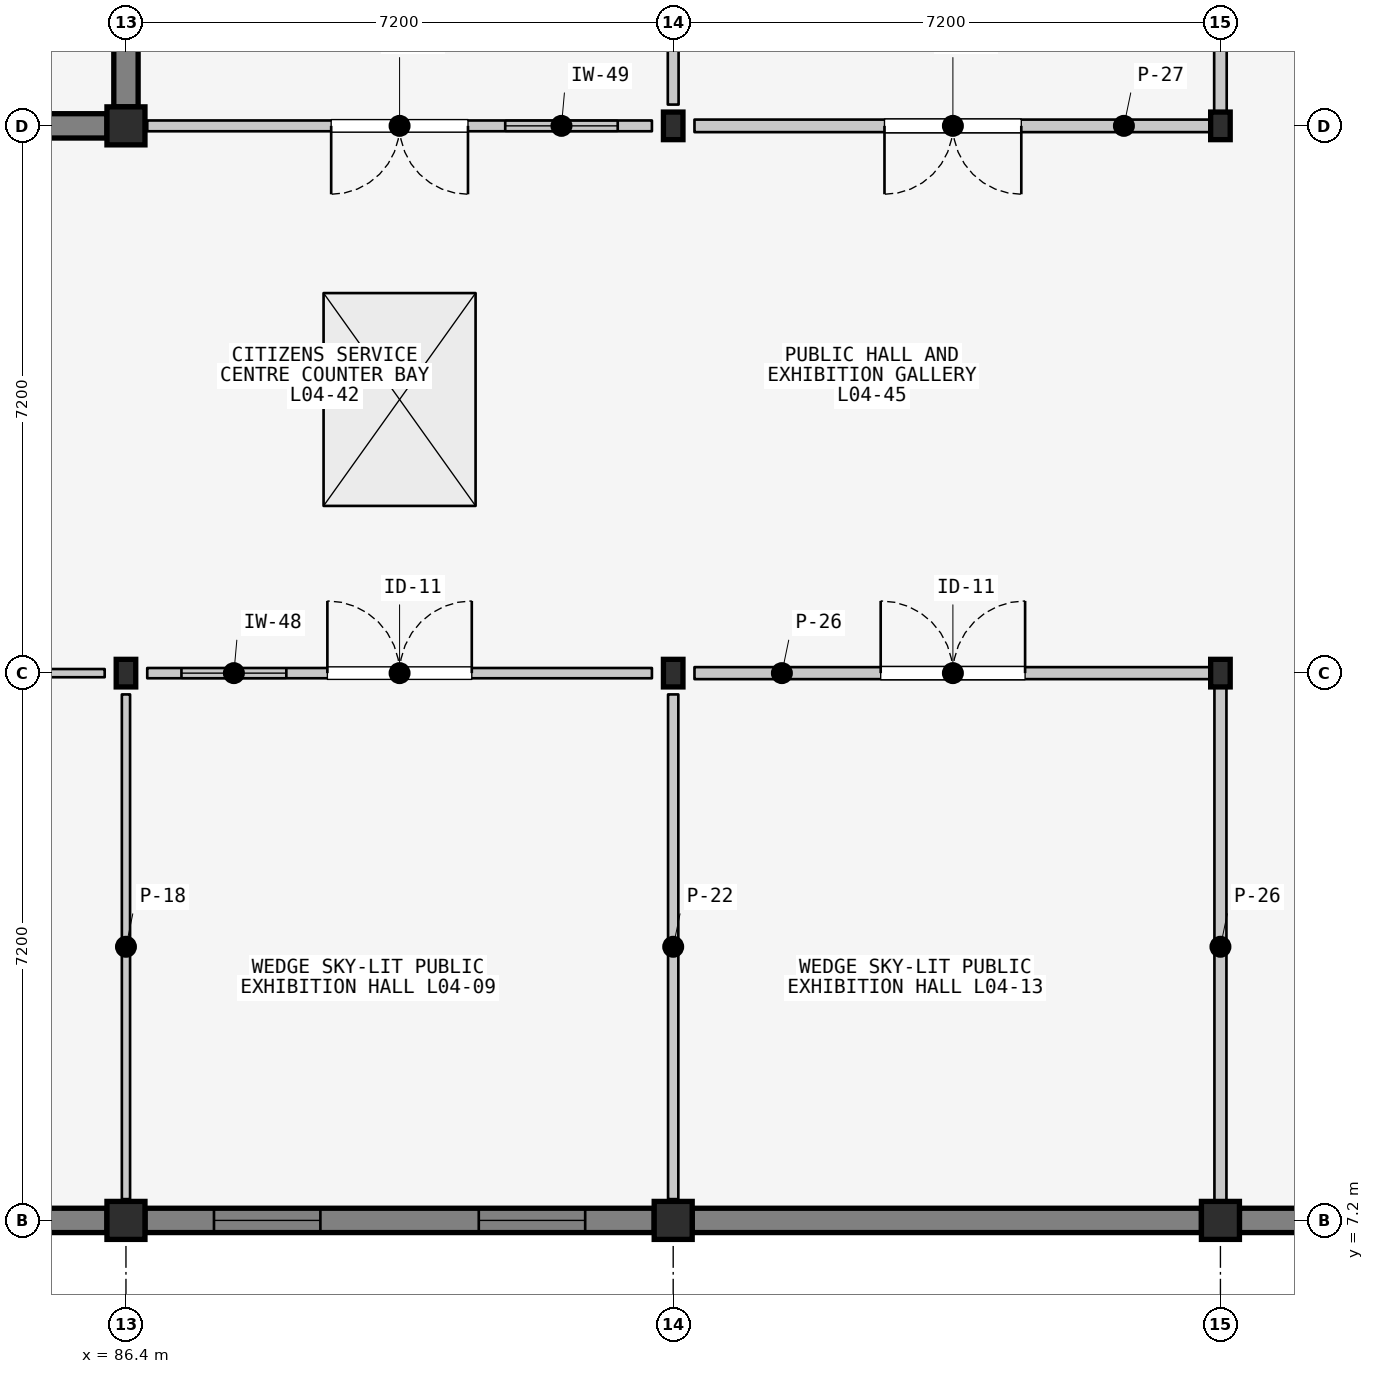
"""IFC4 building model, lengths in metres.
Left out: names, types, materials, properties, quantities, classifications, styles, units other than length and angle.
Written with IfcOpenShell. Run it as: python <this file> out.ifc"""

import sys

from ifc_helpers import new_model, si_unit, direction, frame, frame_2d, origin, origin_2d, place, context, subcontext, project, spatial, rectangle, i_section, extrude, element, fill, save


model = new_model("IFC4")
c1 = context("Model", 3, precision=1e-05, world=origin(), true_north=direction((0.0, 1.0)))
c2 = subcontext(c1, "Body", "Model", "MODEL_VIEW")
j1 = project(units=[si_unit("LENGTHUNIT", "METRE"), si_unit("PLANEANGLEUNIT", "RADIAN")], contexts=[c1])
p1 = place(None, origin())
s1 = spatial("IfcSite", under=j1, at=p1, CompositionType="ELEMENT")
p2 = place(p1, origin())
s2 = spatial("IfcBuilding", under=s1, at=p2, CompositionType="ELEMENT")
p3 = place(p2, frame((0.0, 0.0, 14.1)))
s3 = spatial("IfcBuildingStorey", under=s2, at=p3, CompositionType="ELEMENT", Elevation=14.1)
p4 = place(p3, frame((86.4, 7.2, 0.0), z_axis=(0.0, 0.0, 1.0), x_axis=(1.0, 0.0, 0.0)))
e1 = element("IfcColumn", 1, at=p4, inside=s3, PredefinedType="COLUMN", context=c2, shape_type="SweptSolid", body=[
    extrude(rectangle(XDim=0.5, YDim=0.5, at=origin_2d()), origin(), (0.0, 0.0, 1.0), 4.962),
])
p5 = place(p3, frame((86.4, 14.4, 0.0), z_axis=(0.0, 0.0, 1.0), x_axis=(1.0, 0.0, 0.0)))
e2 = element("IfcColumn", 2, at=p5, inside=s3, PredefinedType="COLUMN", context=c2, shape_type="SweptSolid", body=[
    extrude(i_section(OverallWidth=0.257, OverallDepth=0.363, WebThickness=0.013, FlangeThickness=0.022, FilletRadius=0.015, at=origin_2d()), origin(), (0.0, 0.0, 1.0), 6.305),
])
p6 = place(p3, frame((86.4, 21.6, 0.0), z_axis=(0.0, 0.0, 1.0), x_axis=(1.0, 0.0, 0.0)))
e3 = element("IfcColumn", 3, at=p6, inside=s3, PredefinedType="COLUMN", context=c2, shape_type="SweptSolid", body=[
    extrude(rectangle(XDim=0.5, YDim=0.5, at=origin_2d()), origin(), (0.0, 0.0, 1.0), 7.647),
])
p7 = place(p3, frame((93.6, 7.2, 0.0), z_axis=(0.0, 0.0, 1.0), x_axis=(1.0, 0.0, 0.0)))
e4 = element("IfcColumn", 4, at=p7, inside=s3, PredefinedType="COLUMN", context=c2, shape_type="SweptSolid", body=[
    extrude(rectangle(XDim=0.5, YDim=0.5, at=origin_2d()), origin(), (0.0, 0.0, 1.0), 4.99),
])
p8 = place(p3, frame((93.6, 14.4, 0.0), z_axis=(0.0, 0.0, 1.0), x_axis=(1.0, 0.0, 0.0)))
e5 = element("IfcColumn", 5, at=p8, inside=s3, PredefinedType="COLUMN", context=c2, shape_type="SweptSolid", body=[
    extrude(i_section(OverallWidth=0.257, OverallDepth=0.363, WebThickness=0.013, FlangeThickness=0.022, FilletRadius=0.015, at=origin_2d()), origin(), (0.0, 0.0, 1.0), 6.333),
])
p9 = place(p3, frame((93.6, 21.6, 0.0), z_axis=(0.0, 0.0, 1.0), x_axis=(1.0, 0.0, 0.0)))
e6 = element("IfcColumn", 6, at=p9, inside=s3, PredefinedType="COLUMN", context=c2, shape_type="SweptSolid", body=[
    extrude(i_section(OverallWidth=0.257, OverallDepth=0.363, WebThickness=0.013, FlangeThickness=0.022, FilletRadius=0.015, at=origin_2d()), origin(), (0.0, 0.0, 1.0), 7.676),
])
p10 = place(p3, frame((100.8, 7.2, 0.0), z_axis=(0.0, 0.0, 1.0), x_axis=(1.0, 0.0, 0.0)))
e7 = element("IfcColumn", 7, at=p10, inside=s3, PredefinedType="COLUMN", context=c2, shape_type="SweptSolid", body=[
    extrude(rectangle(XDim=0.5, YDim=0.5, at=origin_2d()), origin(), (0.0, 0.0, 1.0), 5.019),
])
p11 = place(p3, frame((100.8, 14.4, 0.0), z_axis=(0.0, 0.0, 1.0), x_axis=(1.0, 0.0, 0.0)))
e8 = element("IfcColumn", 8, at=p11, inside=s3, PredefinedType="COLUMN", context=c2, shape_type="SweptSolid", body=[
    extrude(i_section(OverallWidth=0.257, OverallDepth=0.363, WebThickness=0.013, FlangeThickness=0.022, FilletRadius=0.015, at=origin_2d()), origin(), (0.0, 0.0, 1.0), 6.362),
])
p12 = place(p3, frame((100.8, 21.6, 0.0), z_axis=(0.0, 0.0, 1.0), x_axis=(1.0, 0.0, 0.0)))
e9 = element("IfcColumn", 9, at=p12, inside=s3, PredefinedType="COLUMN", context=c2, shape_type="SweptSolid", body=[
    extrude(i_section(OverallWidth=0.257, OverallDepth=0.363, WebThickness=0.013, FlangeThickness=0.022, FilletRadius=0.015, at=origin_2d()), origin(), (0.0, 0.0, 1.0), 7.705),
])
p13 = place(p3, frame((86.15, 7.2, 0.0), z_axis=(0.0, 0.0, 1.0), x_axis=(-1.0, 0.0, 0.0)))
e10 = element("IfcWall", 10, at=p13, inside=s3, PredefinedType="SOLIDWALL", context=c2, shape_type="SweptSolid", body=[
    extrude(rectangle(XDim=6.7, YDim=0.32, at=frame_2d((3.35, 0.0))), origin(), (0.0, 0.0, 1.0), 4.206),
])
p14 = place(p3, frame((79.45, 21.6, 0.0), z_axis=(0.0, 0.0, 1.0), x_axis=(1.0, 0.0, 0.0)))
e11 = element("IfcWall", 11, at=p14, inside=s3, PredefinedType="SOLIDWALL", context=c2, shape_type="SweptSolid", body=[
    extrude(rectangle(XDim=6.7, YDim=0.32, at=frame_2d((3.35, 0.0))), origin(), (0.0, 0.0, 1.0), 6.892),
])
p15 = place(p3, frame((93.35, 7.2, 0.0), z_axis=(0.0, 0.0, 1.0), x_axis=(-1.0, 0.0, 0.0)))
e12 = element("IfcWall", 12, at=p15, inside=s3, PredefinedType="SOLIDWALL", context=c2, shape_type="SweptSolid", body=[
    extrude(rectangle(XDim=6.7, YDim=0.32, at=frame_2d((3.35, 0.0))), origin(), (0.0, 0.0, 1.0), 4.235),
])
p16 = place(p15, frame((0.908, 0.0, 0.95)))
e13 = element("IfcOpeningElement", 13, at=p16, cuts=e12, PredefinedType="OPENING", context=c2, shape_type="SweptSolid", body=[
    extrude(rectangle(XDim=1.4, YDim=2.1, at=frame_2d((0.7, 1.05))), frame((0.0, 0.17, 0.0), z_axis=(0.0, -1.0, 0.0), x_axis=(1.0, 0.0, 0.0)), (0.0, 0.0, 1.0), 0.34),
])
p17 = place(p15, frame((4.392, 0.0, 0.95)))
e14 = element("IfcOpeningElement", 14, at=p17, cuts=e12, PredefinedType="OPENING", context=c2, shape_type="SweptSolid", body=[
    extrude(rectangle(XDim=1.4, YDim=2.1, at=frame_2d((0.7, 1.05))), frame((0.0, 0.17, 0.0), z_axis=(0.0, -1.0, 0.0), x_axis=(1.0, 0.0, 0.0)), (0.0, 0.0, 1.0), 0.34),
])
p18 = place(p3, frame((86.4, 21.85, 0.0), z_axis=(0.0, 0.0, 1.0), x_axis=(0.0, 1.0, 0.0)))
e15 = element("IfcWall", 15, at=p18, inside=s3, PredefinedType="SOLIDWALL", context=c2, shape_type="SweptSolid", body=[
    extrude(rectangle(XDim=6.7, YDim=0.32, at=frame_2d((3.35, 0.0))), origin(), (0.0, 0.0, 1.0), 6.965),
])
p19 = place(p3, frame((100.55, 7.2, 0.0), z_axis=(0.0, 0.0, 1.0), x_axis=(-1.0, 0.0, 0.0)))
e16 = element("IfcWall", 16, at=p19, inside=s3, PredefinedType="SOLIDWALL", context=c2, shape_type="SweptSolid", body=[
    extrude(rectangle(XDim=6.7, YDim=0.32, at=frame_2d((3.35, 0.0))), origin(), (0.0, 0.0, 1.0), 4.263),
])
p20 = place(p3, frame((107.75, 7.2, 0.0), z_axis=(0.0, 0.0, 1.0), x_axis=(-1.0, 0.0, 0.0)))
e17 = element("IfcWall", 17, at=p20, inside=s3, PredefinedType="SOLIDWALL", context=c2, shape_type="SweptSolid", body=[
    extrude(rectangle(XDim=6.7, YDim=0.32, at=frame_2d((3.35, 0.0))), origin(), (0.0, 0.0, 1.0), 4.292),
])
p21 = place(p20, frame((0.908, 0.0, 0.95)))
e18 = element("IfcOpeningElement", 18, at=p21, cuts=e17, PredefinedType="OPENING", context=c2, shape_type="SweptSolid", body=[
    extrude(rectangle(XDim=1.4, YDim=2.1, at=frame_2d((0.7, 1.05))), frame((0.0, 0.17, 0.0), z_axis=(0.0, -1.0, 0.0), x_axis=(1.0, 0.0, 0.0)), (0.0, 0.0, 1.0), 0.34),
])
p22 = place(p20, frame((4.392, 0.0, 0.95)))
e19 = element("IfcOpeningElement", 19, at=p22, cuts=e17, PredefinedType="OPENING", context=c2, shape_type="SweptSolid", body=[
    extrude(rectangle(XDim=1.4, YDim=2.1, at=frame_2d((0.7, 1.05))), frame((0.0, 0.17, 0.0), z_axis=(0.0, -1.0, 0.0), x_axis=(1.0, 0.0, 0.0)), (0.0, 0.0, 1.0), 0.34),
])
p23 = place(p3, frame((79.48, 14.4, 0.0), z_axis=(0.0, 0.0, 1.0), x_axis=(1.0, 0.0, 0.0)))
e20 = element("IfcWall", 20, at=p23, inside=s3, PredefinedType="PARTITIONING", context=c2, shape_type="SweptSolid", body=[
    extrude(rectangle(XDim=6.64, YDim=0.108, at=frame_2d((3.32, 0.0))), origin(), (0.0, 0.0, 1.0), 3.72),
])
p24 = place(p23, frame((2.37, 0.0, 0.0)))
e21 = element("IfcOpeningElement", 21, at=p24, cuts=e20, PredefinedType="OPENING", context=c2, shape_type="SweptSolid", body=[
    extrude(rectangle(XDim=1.9, YDim=2.45, at=frame_2d((0.95, 1.225))), frame((0.0, 0.064, 0.0), z_axis=(0.0, -1.0, 0.0), x_axis=(1.0, 0.0, 0.0)), (0.0, 0.0, 1.0), 0.128),
])
p25 = place(p3, frame((86.4, 14.12, 0.0), z_axis=(0.0, 0.0, 1.0), x_axis=(0.0, -1.0, 0.0)))
e22 = element("IfcWall", 22, at=p25, inside=s3, PredefinedType="PARTITIONING", context=c2, shape_type="SweptSolid", body=[
    extrude(rectangle(XDim=6.64, YDim=0.108, at=frame_2d((3.32, 0.0))), origin(), (0.0, 0.0, 1.0), 3.72),
])
p26 = place(p3, frame((86.68, 14.4, 0.0), z_axis=(0.0, 0.0, 1.0), x_axis=(1.0, 0.0, 0.0)))
e23 = element("IfcWall", 23, at=p26, inside=s3, PredefinedType="PARTITIONING", context=c2, shape_type="SweptSolid", body=[
    extrude(rectangle(XDim=6.64, YDim=0.135, at=frame_2d((3.32, 0.0))), origin(), (0.0, 0.0, 1.0), 3.72),
])
p27 = place(p26, frame((2.37, 0.0, 0.0)))
e24 = element("IfcOpeningElement", 24, at=p27, cuts=e23, PredefinedType="OPENING", context=c2, shape_type="SweptSolid", body=[
    extrude(rectangle(XDim=1.9, YDim=2.45, at=frame_2d((0.95, 1.225))), frame((0.0, 0.077, 0.0), z_axis=(0.0, -1.0, 0.0), x_axis=(1.0, 0.0, 0.0)), (0.0, 0.0, 1.0), 0.155),
])
p28 = place(p26, frame((0.45, 0.0, 1.05)))
e25 = element("IfcOpeningElement", 25, at=p28, cuts=e23, PredefinedType="OPENING", context=c2, shape_type="SweptSolid", body=[
    extrude(rectangle(XDim=1.38, YDim=1.44, at=frame_2d((0.69, 0.72))), frame((0.0, 0.077, 0.0), z_axis=(0.0, -1.0, 0.0), x_axis=(1.0, 0.0, 0.0)), (0.0, 0.0, 1.0), 0.155),
])
p29 = place(p3, frame((93.6, 14.12, 0.0), z_axis=(0.0, 0.0, 1.0), x_axis=(0.0, -1.0, 0.0)))
e26 = element("IfcWall", 26, at=p29, inside=s3, PredefinedType="PARTITIONING", context=c2, shape_type="SweptSolid", body=[
    extrude(rectangle(XDim=6.64, YDim=0.135, at=frame_2d((3.32, 0.0))), origin(), (0.0, 0.0, 1.0), 3.72),
])
p30 = place(p3, frame((93.32, 21.6, 0.0), z_axis=(0.0, 0.0, 1.0), x_axis=(-1.0, 0.0, 0.0)))
e27 = element("IfcWall", 27, at=p30, inside=s3, PredefinedType="PARTITIONING", context=c2, shape_type="SweptSolid", body=[
    extrude(rectangle(XDim=6.64, YDim=0.142, at=frame_2d((3.32, 0.0))), origin(), (0.0, 0.0, 1.0), 3.72),
])
p31 = place(p30, frame((2.42, 0.0, 0.0)))
e28 = element("IfcOpeningElement", 28, at=p31, cuts=e27, PredefinedType="OPENING", context=c2, shape_type="SweptSolid", body=[
    extrude(rectangle(XDim=1.8, YDim=2.4, at=frame_2d((0.9, 1.2))), frame((0.0, 0.081, 0.0), z_axis=(0.0, -1.0, 0.0), x_axis=(1.0, 0.0, 0.0)), (0.0, 0.0, 1.0), 0.162),
])
p32 = place(p30, frame((0.45, 0.0, 1.05)))
e29 = element("IfcOpeningElement", 29, at=p32, cuts=e27, PredefinedType="OPENING", context=c2, shape_type="SweptSolid", body=[
    extrude(rectangle(XDim=1.48, YDim=1.48, at=frame_2d((0.74, 0.74))), frame((0.0, 0.081, 0.0), z_axis=(0.0, -1.0, 0.0), x_axis=(1.0, 0.0, 0.0)), (0.0, 0.0, 1.0), 0.162),
])
p33 = place(p3, frame((93.6, 28.52, 0.0), z_axis=(0.0, 0.0, 1.0), x_axis=(0.0, -1.0, 0.0)))
e30 = element("IfcWall", 30, at=p33, inside=s3, PredefinedType="PARTITIONING", context=c2, shape_type="SweptSolid", body=[
    extrude(rectangle(XDim=6.64, YDim=0.142, at=frame_2d((3.32, 0.0))), origin(), (0.0, 0.0, 1.0), 3.72),
])
p34 = place(p3, frame((93.88, 14.4, 0.0), z_axis=(0.0, 0.0, 1.0), x_axis=(1.0, 0.0, 0.0)))
e31 = element("IfcWall", 31, at=p34, inside=s3, PredefinedType="PARTITIONING", context=c2, shape_type="SweptSolid", body=[
    extrude(rectangle(XDim=6.8, YDim=0.158, at=frame_2d((3.4, 0.0))), origin(), (0.0, 0.0, 1.0), 3.72),
])
p35 = place(p34, frame((2.45, 0.0, 0.0)))
e32 = element("IfcOpeningElement", 32, at=p35, cuts=e31, PredefinedType="OPENING", context=c2, shape_type="SweptSolid", body=[
    extrude(rectangle(XDim=1.9, YDim=2.45, at=frame_2d((0.95, 1.225))), frame((0.0, 0.089, 0.0), z_axis=(0.0, -1.0, 0.0), x_axis=(1.0, 0.0, 0.0)), (0.0, 0.0, 1.0), 0.178),
])
p36 = place(p3, frame((100.8, 14.28, 0.0), z_axis=(0.0, 0.0, 1.0), x_axis=(0.0, -1.0, 0.0)))
e33 = element("IfcWall", 33, at=p36, inside=s3, PredefinedType="PARTITIONING", context=c2, shape_type="SweptSolid", body=[
    extrude(rectangle(XDim=6.96, YDim=0.158, at=frame_2d((3.48, 0.0))), origin(), (0.0, 0.0, 1.0), 3.72),
])
p37 = place(p3, frame((100.68, 21.6, 0.0), z_axis=(0.0, 0.0, 1.0), x_axis=(-1.0, 0.0, 0.0)))
e34 = element("IfcWall", 34, at=p37, inside=s3, PredefinedType="PARTITIONING", context=c2, shape_type="SweptSolid", body=[
    extrude(rectangle(XDim=6.8, YDim=0.165, at=frame_2d((3.4, 0.0))), origin(), (0.0, 0.0, 1.0), 3.72),
])
p38 = place(p37, frame((2.5, 0.0, 0.0)))
e35 = element("IfcOpeningElement", 35, at=p38, cuts=e34, PredefinedType="OPENING", context=c2, shape_type="SweptSolid", body=[
    extrude(rectangle(XDim=1.8, YDim=2.4, at=frame_2d((0.9, 1.2))), frame((0.0, 0.093, 0.0), z_axis=(0.0, -1.0, 0.0), x_axis=(1.0, 0.0, 0.0)), (0.0, 0.0, 1.0), 0.185),
])
p39 = place(p3, frame((100.8, 28.68, 0.0), z_axis=(0.0, 0.0, 1.0), x_axis=(0.0, -1.0, 0.0)))
e36 = element("IfcWall", 36, at=p39, inside=s3, PredefinedType="PARTITIONING", context=c2, shape_type="SweptSolid", body=[
    extrude(rectangle(XDim=6.96, YDim=0.165, at=frame_2d((3.48, 0.0))), origin(), (0.0, 0.0, 1.0), 3.72),
])
p40 = place(p16, origin())
e37 = element("IfcWindow", 37, at=p40, inside=s3, PartitioningType="SINGLE_PANEL", PredefinedType="WINDOW", context=c2, shape_type="SweptSolid", body=[
    extrude(rectangle(XDim=1.4, YDim=2.1, at=frame_2d((0.7, 1.05))), frame((0.0, 0.03, 0.0), z_axis=(0.0, -1.0, 0.0), x_axis=(1.0, 0.0, 0.0)), (0.0, 0.0, 1.0), 0.06),
])
fill(e13, e37)
p41 = place(p17, origin())
e38 = element("IfcWindow", 38, at=p41, inside=s3, PartitioningType="SINGLE_PANEL", PredefinedType="WINDOW", context=c2, shape_type="SweptSolid", body=[
    extrude(rectangle(XDim=1.4, YDim=2.1, at=frame_2d((0.7, 1.05))), frame((0.0, 0.03, 0.0), z_axis=(0.0, -1.0, 0.0), x_axis=(1.0, 0.0, 0.0)), (0.0, 0.0, 1.0), 0.06),
])
fill(e14, e38)
p42 = place(p3, frame((64.8, 7.2, 5.1), z_axis=(-0.003900009496, -0.183347177316, 0.983040488737), x_axis=(0.999992130387, 0.0, 0.003967261622)))
p43 = place(p42, frame((25.208, 10.986, 0.0)))
p44 = place(p43, origin())
e39 = element("IfcWindow", 39, at=p44, inside=s3, PartitioningType="SINGLE_PANEL", PredefinedType="SKYLIGHT", context=c2, shape_type="SweptSolid", body=[
    extrude(rectangle(XDim=2.0, YDim=2.8, at=origin_2d()), origin(), (0.0, 0.0, -1.0), 0.06),
])
p45 = place(p27, origin())
e40 = element("IfcDoor", 40, at=p45, inside=s3, OperationType="DOUBLE_DOOR_SINGLE_SWING", PredefinedType="DOOR", context=c2, shape_type="SweptSolid", body=[
    extrude(rectangle(XDim=1.9, YDim=2.45, at=frame_2d((0.95, 1.225))), frame((0.0, 0.025, 0.0), z_axis=(0.0, -1.0, 0.0), x_axis=(1.0, 0.0, 0.0)), (0.0, 0.0, 1.0), 0.05),
])
fill(e24, e40)
p46 = place(p28, origin())
e41 = element("IfcWindow", 41, at=p46, inside=s3, PartitioningType="SINGLE_PANEL", PredefinedType="WINDOW", context=c2, shape_type="SweptSolid", body=[
    extrude(rectangle(XDim=1.38, YDim=1.44, at=frame_2d((0.69, 0.72))), frame((0.0, 0.03, 0.0), z_axis=(0.0, -1.0, 0.0), x_axis=(1.0, 0.0, 0.0)), (0.0, 0.0, 1.0), 0.06),
])
fill(e25, e41)
p47 = place(p31, origin())
e42 = element("IfcDoor", 42, at=p47, inside=s3, OperationType="DOUBLE_DOOR_SINGLE_SWING", PredefinedType="DOOR", context=c2, shape_type="SweptSolid", body=[
    extrude(rectangle(XDim=1.8, YDim=2.4, at=frame_2d((0.9, 1.2))), frame((0.0, 0.025, 0.0), z_axis=(0.0, -1.0, 0.0), x_axis=(1.0, 0.0, 0.0)), (0.0, 0.0, 1.0), 0.05),
])
fill(e28, e42)
p48 = place(p32, origin())
e43 = element("IfcWindow", 43, at=p48, inside=s3, PartitioningType="SINGLE_PANEL", PredefinedType="WINDOW", context=c2, shape_type="SweptSolid", body=[
    extrude(rectangle(XDim=1.48, YDim=1.48, at=frame_2d((0.74, 0.74))), frame((0.0, 0.03, 0.0), z_axis=(0.0, -1.0, 0.0), x_axis=(1.0, 0.0, 0.0)), (0.0, 0.0, 1.0), 0.06),
])
fill(e29, e43)
p49 = place(p35, origin())
e44 = element("IfcDoor", 44, at=p49, inside=s3, OperationType="DOUBLE_DOOR_SINGLE_SWING", PredefinedType="DOOR", context=c2, shape_type="SweptSolid", body=[
    extrude(rectangle(XDim=1.9, YDim=2.45, at=frame_2d((0.95, 1.225))), frame((0.0, 0.025, 0.0), z_axis=(0.0, -1.0, 0.0), x_axis=(1.0, 0.0, 0.0)), (0.0, 0.0, 1.0), 0.05),
])
fill(e32, e44)
p50 = place(p38, origin())
e45 = element("IfcDoor", 45, at=p50, inside=s3, OperationType="DOUBLE_DOOR_SINGLE_SWING", PredefinedType="DOOR", context=c2, shape_type="SweptSolid", body=[
    extrude(rectangle(XDim=1.8, YDim=2.4, at=frame_2d((0.9, 1.2))), frame((0.0, 0.025, 0.0), z_axis=(0.0, -1.0, 0.0), x_axis=(1.0, 0.0, 0.0)), (0.0, 0.0, 1.0), 0.05),
])
fill(e35, e45)
save(model, sys.argv[1])
